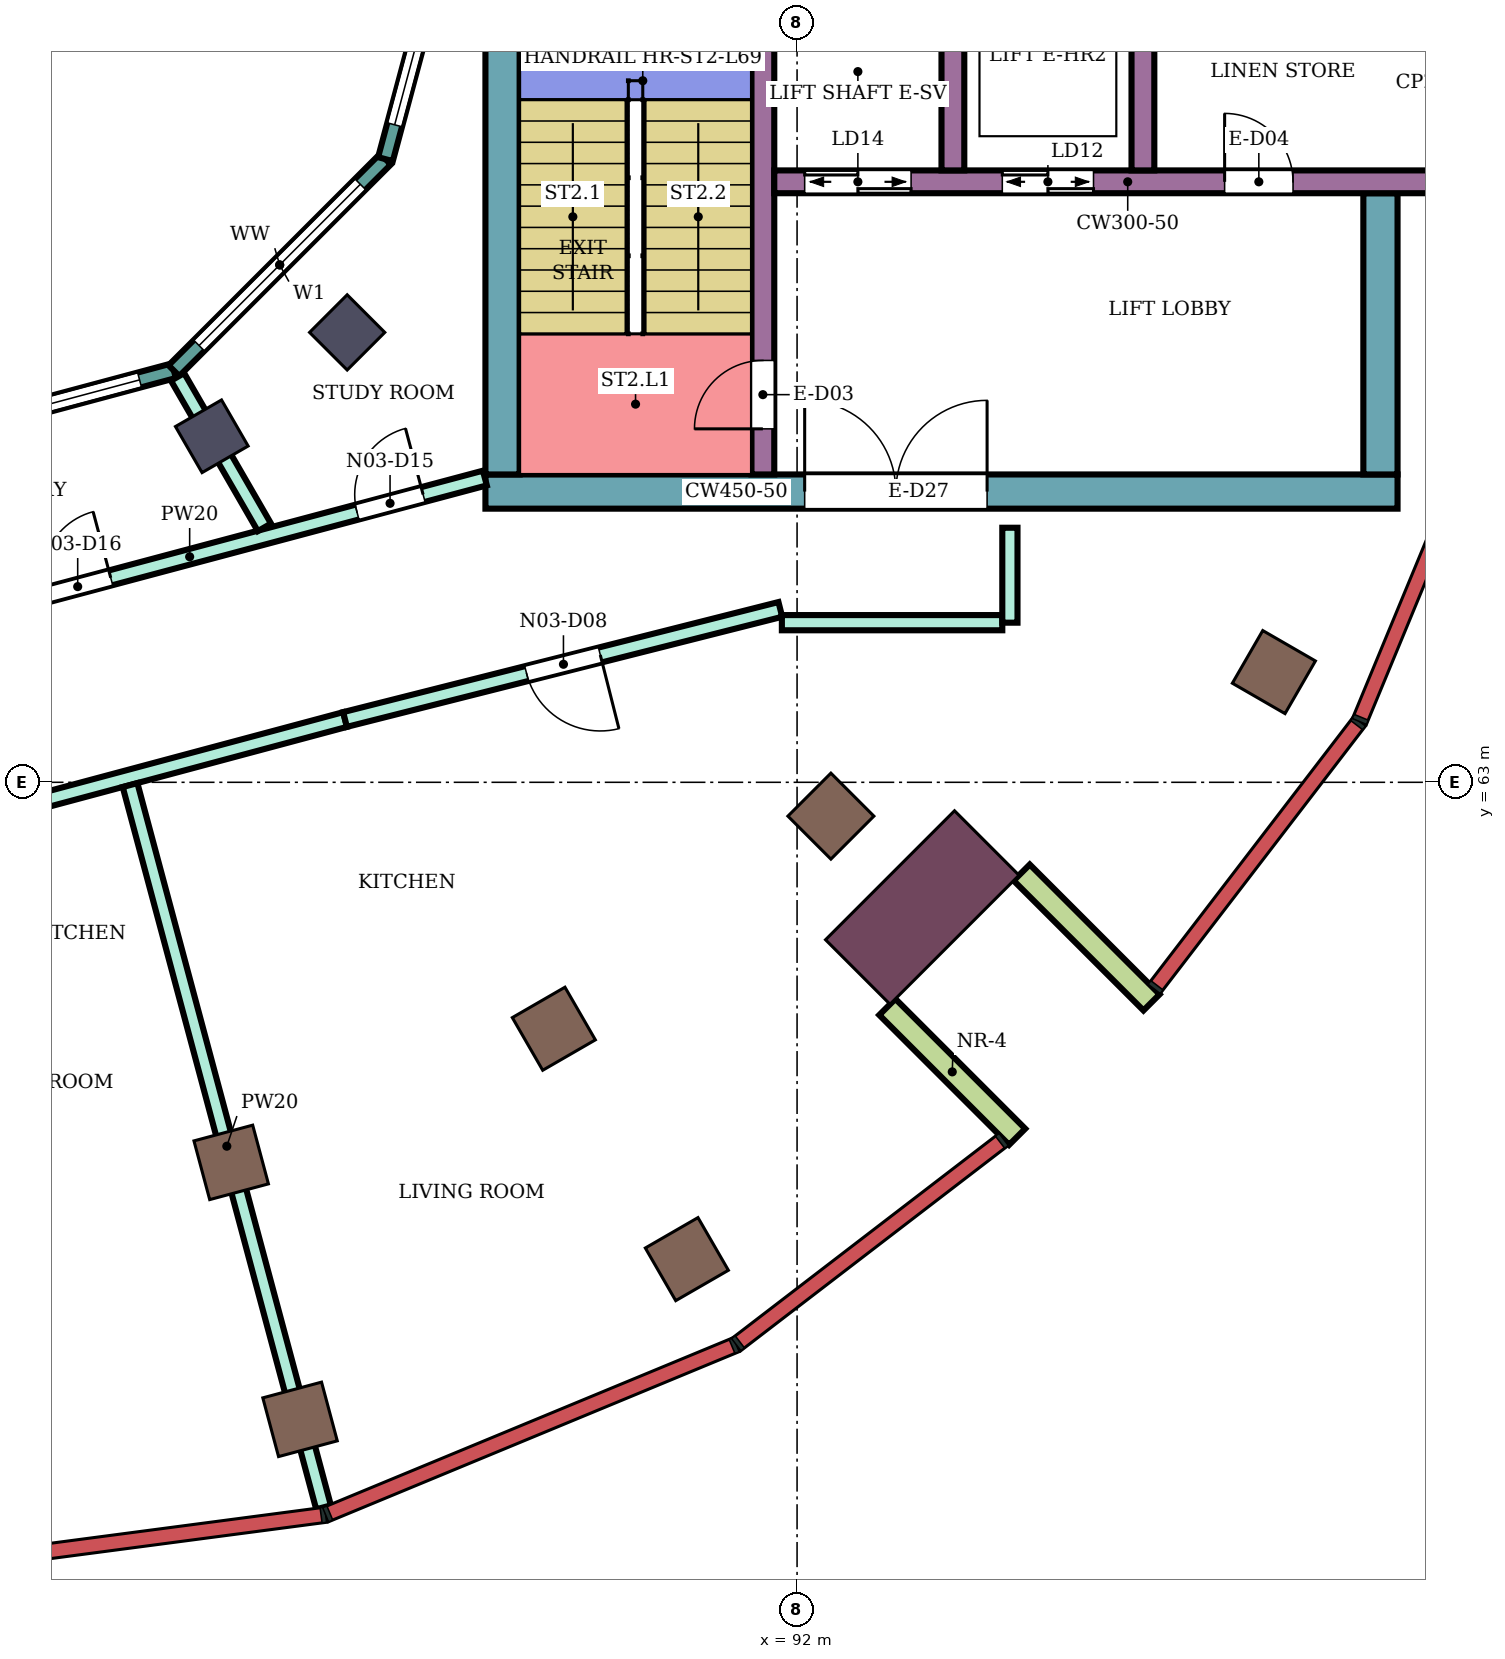
"""IFC4 building model, lengths in metres.
Left out: names, types, materials, properties, quantities, classifications, styles, units other than length and angle.
Written with IfcOpenShell. Run it as: python <this file> out.ifc"""

import sys

from ifc_helpers import new_model, si_unit, direction, frame, frame_2d, origin, origin_2d, place, context, subcontext, project, spatial, rectangle, extrude, element, fill, save


model = new_model("IFC4")
c1 = context("Model", 3, precision=1e-05, world=origin(), true_north=direction((0.0, 1.0)))
c2 = subcontext(c1, "Body", "Model", "MODEL_VIEW")
j1 = project(units=[si_unit("LENGTHUNIT", "METRE"), si_unit("PLANEANGLEUNIT", "RADIAN")], contexts=[c1])
p1 = place(None, origin())
s1 = spatial("IfcSite", under=j1, at=p1, CompositionType="ELEMENT")
p2 = place(p1, origin())
s2 = spatial("IfcBuilding", under=s1, at=p2, CompositionType="ELEMENT")
p3 = place(p2, frame((0.0, 0.0, 300.9)))
s3 = spatial("IfcBuildingStorey", under=s2, at=p3, CompositionType="ELEMENT", Elevation=300.9)
for number, where, z_axis, x_axis in (
    (1, (85.461, 54.619, 0.0), (0.0, 0.0, 1.0), (0.259, -0.966, 0.0)),
    (2, (90.55, 56.727, 0.0), (0.0, 0.0, 1.0), (0.5, -0.866, 0.0)),
    (3, (98.273, 64.45, 0.0), (0.0, 0.0, 1.0), (0.866, -0.5, 0.0)),
    (4, (84.555, 58.0, 0.0), (0.0, 0.0, 1.0), (0.259, -0.966, 0.0)),
    (5, (88.8, 59.758, 0.0), (0.0, 0.0, 1.0), (0.5, -0.866, 0.0)),
    (6, (92.445, 62.555, 0.0), (0.0, 0.0, 1.0), (0.707, -0.707, 0.0)),
):
    element("IfcColumn", number, at=place(p3, frame(where, z_axis=z_axis, x_axis=x_axis)), inside=s3, PredefinedType="COLUMN", context=c2, shape_type="SweptSolid", body=[
        extrude(rectangle(XDim=0.8, YDim=0.8, at=origin_2d()), origin(), (0.0, 0.0, 1.0), 4.2),
    ])
for number, where, z_axis, x_axis in (
    (7, (84.3, 67.552, 0.0), (0.0, 0.0, 1.0), (0.5, -0.866, 0.0)),
    (8, (86.081, 68.919, 0.0), (0.0, 0.0, 1.0), (0.707, -0.707, 0.0)),
):
    element("IfcColumn", number, at=place(p3, frame(where, z_axis=z_axis, x_axis=x_axis)), inside=s3, PredefinedType="COLUMN", context=c2, shape_type="SweptSolid", body=[
        extrude(rectangle(XDim=0.7, YDim=0.7, at=origin_2d()), origin(), (0.0, 0.0, 1.0), 4.2),
    ])
p4 = place(p3, frame((93.647, 61.353, 0.0), z_axis=(0.0, 0.0, 1.0), x_axis=(0.707106781187, -0.707106781187, 0.0)))
e9 = element("IfcColumn", 9, at=p4, inside=s3, PredefinedType="COLUMN", context=c2, shape_type="SweptSolid", body=[
    extrude(rectangle(XDim=1.2, YDim=2.4, at=origin_2d()), origin(), (0.0, 0.0, 1.0), 4.2),
])
p5 = place(p3, frame((87.9, 66.825, 0.0), z_axis=(0.0, 0.0, 1.0), x_axis=(1.0, 0.0, 0.0)))
e10 = element("IfcWall", 10, at=p5, inside=s3, PredefinedType="SHEAR", context=c2, shape_type="SweptSolid", body=[
    extrude(rectangle(XDim=12.0, YDim=0.45, at=frame_2d((6.0, 0.0))), origin(), (0.0, 0.0, 1.0), 3.88),
])
p6 = place(p5, frame((4.2, 0.0, 0.0)))
e11 = element("IfcOpeningElement", 11, at=p6, cuts=e10, PredefinedType="OPENING", context=c2, shape_type="SweptSolid", body=[
    extrude(rectangle(XDim=2.4, YDim=2.4, at=frame_2d((1.2, 1.2))), frame((0.0, 0.235, 0.0), z_axis=(0.0, -1.0, 0.0), x_axis=(1.0, 0.0, 0.0)), (0.0, 0.0, 1.0), 0.47),
])
p7 = place(p3, frame((88.125, 67.05, 0.0), z_axis=(0.0, 0.0, 1.0), x_axis=(0.0, 1.0, 0.0)))
e12 = element("IfcWall", 12, at=p7, inside=s3, PredefinedType="SHEAR", context=c2, shape_type="SweptSolid", body=[
    extrude(rectangle(XDim=7.95, YDim=0.45, at=frame_2d((3.975, 0.0))), origin(), (0.0, 0.0, 1.0), 3.88),
])
p8 = place(p3, frame((99.675, 67.05, 0.0), z_axis=(0.0, 0.0, 1.0), x_axis=(0.0, 1.0, 0.0)))
e13 = element("IfcWall", 13, at=p8, inside=s3, PredefinedType="SHEAR", context=c2, shape_type="SweptSolid", body=[
    extrude(rectangle(XDim=3.7, YDim=0.45, at=frame_2d((1.85, 0.0))), origin(), (0.0, 0.0, 1.0), 3.88),
])
p9 = place(p3, frame((91.55, 67.05, 0.0), z_axis=(0.0, 0.0, 1.0), x_axis=(0.0, 1.0, 0.0)))
e14 = element("IfcWall", 14, at=p9, inside=s3, PredefinedType="SHEAR", context=c2, shape_type="SweptSolid", body=[
    extrude(rectangle(XDim=7.95, YDim=0.3, at=frame_2d((3.975, 0.0))), origin(), (0.0, 0.0, 1.0), 3.88),
])
p10 = place(p9, frame((0.6, 0.0, 0.0)))
e15 = element("IfcOpeningElement", 15, at=p10, cuts=e14, PredefinedType="OPENING", context=c2, shape_type="SweptSolid", body=[
    extrude(rectangle(XDim=0.9, YDim=2.1, at=frame_2d((0.45, 1.05))), frame((0.0, 0.16, 0.0), z_axis=(0.0, -1.0, 0.0), x_axis=(1.0, 0.0, 0.0)), (0.0, 0.0, 1.0), 0.32),
])
p11 = place(p3, frame((91.7, 70.9, 0.0), z_axis=(0.0, 0.0, 1.0), x_axis=(1.0, 0.0, 0.0)))
e16 = element("IfcWall", 16, at=p11, inside=s3, PredefinedType="SHEAR", context=c2, shape_type="SweptSolid", body=[
    extrude(rectangle(XDim=9.3, YDim=0.3, at=frame_2d((4.65, 0.0))), origin(), (0.0, 0.0, 1.0), 3.88),
])
p12 = place(p11, frame((0.4, 0.0, 0.0)))
e17 = element("IfcOpeningElement", 17, at=p12, cuts=e16, PredefinedType="OPENING", context=c2, shape_type="SweptSolid", body=[
    extrude(rectangle(XDim=1.4, YDim=2.1, at=frame_2d((0.7, 1.05))), frame((0.0, 0.16, 0.0), z_axis=(0.0, -1.0, 0.0), x_axis=(1.0, 0.0, 0.0)), (0.0, 0.0, 1.0), 0.32),
])
p13 = place(p11, frame((3.0, 0.0, 0.0)))
e18 = element("IfcOpeningElement", 18, at=p13, cuts=e16, PredefinedType="OPENING", context=c2, shape_type="SweptSolid", body=[
    extrude(rectangle(XDim=1.2, YDim=2.1, at=frame_2d((0.6, 1.05))), frame((0.0, 0.16, 0.0), z_axis=(0.0, -1.0, 0.0), x_axis=(1.0, 0.0, 0.0)), (0.0, 0.0, 1.0), 0.32),
])
p14 = place(p11, frame((5.925, 0.0, 0.0)))
e19 = element("IfcOpeningElement", 19, at=p14, cuts=e16, PredefinedType="OPENING", context=c2, shape_type="SweptSolid", body=[
    extrude(rectangle(XDim=0.9, YDim=2.1, at=frame_2d((0.45, 1.05))), frame((0.0, 0.16, 0.0), z_axis=(0.0, -1.0, 0.0), x_axis=(1.0, 0.0, 0.0)), (0.0, 0.0, 1.0), 0.32),
])
for number, where, z_axis, x_axis in (
    (20, (94.05, 71.05, 0.0), (0.0, 0.0, 1.0), (0.0, 1.0, 0.0)),
    (21, (96.55, 71.05, 0.0), (0.0, 0.0, 1.0), (0.0, 1.0, 0.0)),
):
    element("IfcWall", number, at=place(p3, frame(where, z_axis=z_axis, x_axis=x_axis)), inside=s3, PredefinedType="SHEAR", context=c2, shape_type="SweptSolid", body=[
        extrude(rectangle(XDim=2.55, YDim=0.3, at=frame_2d((1.275, 0.0))), origin(), (0.0, 0.0, 1.0), 3.88),
    ])
for number, where, z_axis, x_axis in (
    (22, (93.188, 60.045, 0.0), (0.0, 0.0, 1.0), (0.707, -0.707, 0.0)),
    (23, (94.955, 61.812, 0.0), (0.0, 0.0, 1.0), (0.707, -0.707, 0.0)),
):
    element("IfcWall", number, at=place(p3, frame(where, z_axis=z_axis, x_axis=x_axis)), inside=s3, PredefinedType="NOTDEFINED", context=c2, shape_type="SweptSolid", body=[
        extrude(rectangle(XDim=2.416, YDim=0.3, at=frame_2d((1.208, 0.0))), origin(), (0.0, 0.0, 1.0), 4.2),
    ])
p15 = place(p3, frame((80.0, 67.396, 0.0), z_axis=(0.0, 0.0, 1.0), x_axis=(0.965933654434, 0.258789828301, 0.0)))
e24 = element("IfcWall", 24, at=p15, inside=s3, PredefinedType="NOTDEFINED", context=c2, shape_type="SweptSolid", body=[
    extrude(rectangle(XDim=3.936, YDim=0.2, at=frame_2d((1.968, 0.0))), origin(), (0.0, 0.0, 1.0), 4.2),
])
p16 = place(p15, frame((0.468, 0.0, 0.9)))
e25 = element("IfcOpeningElement", 25, at=p16, cuts=e24, PredefinedType="OPENING", context=c2, shape_type="SweptSolid", body=[
    extrude(rectangle(XDim=3.0, YDim=2.3, at=frame_2d((1.5, 1.15))), frame((0.0, 0.11, 0.0), z_axis=(0.0, -1.0, 0.0), x_axis=(1.0, 0.0, 0.0)), (0.0, 0.0, 1.0), 0.22),
])
p17 = place(p3, frame((83.802, 68.415, 0.0), z_axis=(0.0, 0.0, 1.0), x_axis=(0.707106781187, 0.707106781187, 0.0)))
e26 = element("IfcWall", 26, at=p17, inside=s3, PredefinedType="NOTDEFINED", context=c2, shape_type="SweptSolid", body=[
    extrude(rectangle(XDim=3.936, YDim=0.2, at=frame_2d((1.968, 0.0))), origin(), (0.0, 0.0, 1.0), 4.2),
])
p18 = place(p17, frame((0.468, 0.0, 0.9)))
e27 = element("IfcOpeningElement", 27, at=p18, cuts=e26, PredefinedType="OPENING", context=c2, shape_type="SweptSolid", body=[
    extrude(rectangle(XDim=3.0, YDim=2.3, at=frame_2d((1.5, 1.15))), frame((0.0, 0.11, 0.0), z_axis=(0.0, -1.0, 0.0), x_axis=(1.0, 0.0, 0.0)), (0.0, 0.0, 1.0), 0.22),
])
p19 = place(p3, frame((86.585, 71.198, 0.0), z_axis=(0.0, 0.0, 1.0), x_axis=(0.258789828301, 0.965933654434, 0.0)))
e28 = element("IfcWall", 28, at=p19, inside=s3, PredefinedType="NOTDEFINED", context=c2, shape_type="SweptSolid", body=[
    extrude(rectangle(XDim=3.936, YDim=0.2, at=frame_2d((1.968, 0.0))), origin(), (0.0, 0.0, 1.0), 4.2),
])
p20 = place(p19, frame((0.468, 0.0, 0.9)))
e29 = element("IfcOpeningElement", 29, at=p20, cuts=e28, PredefinedType="OPENING", context=c2, shape_type="SweptSolid", body=[
    extrude(rectangle(XDim=3.0, YDim=2.3, at=frame_2d((1.5, 1.15))), frame((0.0, 0.11, 0.0), z_axis=(0.0, -1.0, 0.0), x_axis=(1.0, 0.0, 0.0)), (0.0, 0.0, 1.0), 0.22),
])
p21 = place(p3, frame((80.125, 64.932, 0.0), z_axis=(0.0, 0.0, 1.0), x_axis=(0.966236955806, 0.257655089674, 0.0)))
e30 = element("IfcWall", 30, at=p21, inside=s3, PredefinedType="PARTITIONING", context=c2, shape_type="SweptSolid", body=[
    extrude(rectangle(XDim=8.039, YDim=0.2, at=frame_2d((4.02, 0.0))), origin(), (0.0, 0.0, 1.0), 3.75),
])
p22 = place(p21, frame((6.298, 0.0, 0.0)))
e31 = element("IfcOpeningElement", 31, at=p22, cuts=e30, PredefinedType="OPENING", context=c2, shape_type="SweptSolid", body=[
    extrude(rectangle(XDim=0.9, YDim=2.1, at=frame_2d((0.45, 1.05))), frame((0.0, 0.11, 0.0), z_axis=(0.0, -1.0, 0.0), x_axis=(1.0, 0.0, 0.0)), (0.0, 0.0, 1.0), 0.22),
])
p23 = place(p21, frame((2.045, 0.0, 0.0)))
e32 = element("IfcOpeningElement", 32, at=p23, cuts=e30, PredefinedType="OPENING", context=c2, shape_type="SweptSolid", body=[
    extrude(rectangle(XDim=0.9, YDim=2.1, at=frame_2d((0.45, 1.05))), frame((0.0, 0.11, 0.0), z_axis=(0.0, -1.0, 0.0), x_axis=(1.0, 0.0, 0.0)), (0.0, 0.0, 1.0), 0.22),
])
p24 = place(p3, frame((80.048, 62.217, 0.0), z_axis=(0.0, 0.0, 1.0), x_axis=(0.965937709386, 0.258774692708, 0.0)))
e33 = element("IfcWall", 33, at=p24, inside=s3, PredefinedType="PARTITIONING", context=c2, shape_type="SweptSolid", body=[
    extrude(rectangle(XDim=6.216, YDim=0.2, at=frame_2d((3.108, 0.0))), origin(), (0.0, 0.0, 1.0), 3.75),
])
p25 = place(p24, frame((0.5, 0.0, 0.0)))
e34 = element("IfcOpeningElement", 34, at=p25, cuts=e33, PredefinedType="OPENING", context=c2, shape_type="SweptSolid", body=[
    extrude(rectangle(XDim=1.0, YDim=2.1, at=frame_2d((0.5, 1.05))), frame((0.0, 0.11, 0.0), z_axis=(0.0, -1.0, 0.0), x_axis=(1.0, 0.0, 0.0)), (0.0, 0.0, 1.0), 0.22),
])
p26 = place(p3, frame((83.225, 62.963, 0.0), z_axis=(0.0, 0.0, 1.0), x_axis=(0.258782398991, -0.96593564484, 0.0)))
e35 = element("IfcWall", 35, at=p26, inside=s3, PredefinedType="PARTITIONING", context=c2, shape_type="SweptSolid", body=[
    extrude(rectangle(XDim=9.837, YDim=0.2, at=frame_2d((4.918, 0.0))), origin(), (0.0, 0.0, 1.0), 3.75),
])
p27 = place(p3, frame((83.85, 68.333, 0.0), z_axis=(0.0, 0.0, 1.0), x_axis=(0.500080019051, -0.865979199835, 0.0)))
e36 = element("IfcWall", 36, at=p27, inside=s3, PredefinedType="PARTITIONING", context=c2, shape_type="SweptSolid", body=[
    extrude(rectangle(XDim=2.285, YDim=0.2, at=frame_2d((1.143, 0.0))), origin(), (0.0, 0.0, 1.0), 3.75),
])
p28 = place(p3, frame((86.053, 63.826, 0.0), z_axis=(0.0, 0.0, 1.0), x_axis=(0.969480070232, 0.245170131586, 0.0)))
e37 = element("IfcWall", 37, at=p28, inside=s3, PredefinedType="PARTITIONING", context=c2, shape_type="SweptSolid", body=[
    extrude(rectangle(XDim=5.907, YDim=0.2, at=frame_2d((2.954, 0.0))), origin(), (0.0, 0.0, 1.0), 3.75),
])
p29 = place(p28, frame((2.464, 0.0, 0.0)))
e38 = element("IfcOpeningElement", 38, at=p29, cuts=e37, PredefinedType="OPENING", context=c2, shape_type="SweptSolid", body=[
    extrude(rectangle(XDim=1.0, YDim=2.1, at=frame_2d((0.5, 1.05))), frame((0.0, 0.11, 0.0), z_axis=(0.0, -1.0, 0.0), x_axis=(1.0, 0.0, 0.0)), (0.0, 0.0, 1.0), 0.22),
])
p30 = place(p3, frame((91.8, 65.1, 0.0), z_axis=(0.0, 0.0, 1.0), x_axis=(1.0, 0.0, 0.0)))
e39 = element("IfcWall", 39, at=p30, inside=s3, PredefinedType="PARTITIONING", context=c2, shape_type="SweptSolid", body=[
    extrude(rectangle(XDim=2.9, YDim=0.2, at=frame_2d((1.45, 0.0))), origin(), (0.0, 0.0, 1.0), 3.75),
])
p31 = place(p3, frame((94.8, 65.1, 0.0), z_axis=(0.0, 0.0, 1.0), x_axis=(0.0, 1.0, 0.0)))
e40 = element("IfcWall", 40, at=p31, inside=s3, PredefinedType="PARTITIONING", context=c2, shape_type="SweptSolid", body=[
    extrude(rectangle(XDim=1.249, YDim=0.2, at=frame_2d((0.625, 0.0))), origin(), (0.0, 0.0, 1.0), 3.75),
])
p32 = place(p16, origin())
e41 = element("IfcWindow", 41, at=p32, inside=s3, PartitioningType="SINGLE_PANEL", PredefinedType="WINDOW", context=c2, shape_type="SweptSolid", body=[
    extrude(rectangle(XDim=3.0, YDim=2.3, at=frame_2d((1.5, 1.15))), frame((0.0, 0.03, 0.0), z_axis=(0.0, -1.0, 0.0), x_axis=(1.0, 0.0, 0.0)), (0.0, 0.0, 1.0), 0.06),
])
fill(e25, e41)
p33 = place(p18, origin())
e42 = element("IfcWindow", 42, at=p33, inside=s3, PartitioningType="SINGLE_PANEL", PredefinedType="WINDOW", context=c2, shape_type="SweptSolid", body=[
    extrude(rectangle(XDim=3.0, YDim=2.3, at=frame_2d((1.5, 1.15))), frame((0.0, 0.03, 0.0), z_axis=(0.0, -1.0, 0.0), x_axis=(1.0, 0.0, 0.0)), (0.0, 0.0, 1.0), 0.06),
])
fill(e27, e42)
p34 = place(p20, origin())
e43 = element("IfcWindow", 43, at=p34, inside=s3, PartitioningType="SINGLE_PANEL", PredefinedType="WINDOW", context=c2, shape_type="SweptSolid", body=[
    extrude(rectangle(XDim=3.0, YDim=2.3, at=frame_2d((1.5, 1.15))), frame((0.0, 0.03, 0.0), z_axis=(0.0, -1.0, 0.0), x_axis=(1.0, 0.0, 0.0)), (0.0, 0.0, 1.0), 0.06),
])
fill(e29, e43)
p35 = place(p29, frame((1.0, 0.0, 0.0), z_axis=(0.0, 0.0, 1.0), x_axis=(-1.0, 0.0, 0.0)))
e44 = element("IfcDoor", 44, at=p35, inside=s3, OperationType="SINGLE_SWING_LEFT", PredefinedType="DOOR", context=c2, shape_type="SweptSolid", body=[
    extrude(rectangle(XDim=1.0, YDim=2.1, at=frame_2d((0.5, 1.05))), frame((0.0, 0.025, 0.0), z_axis=(0.0, -1.0, 0.0), x_axis=(1.0, 0.0, 0.0)), (0.0, 0.0, 1.0), 0.05),
])
fill(e38, e44)
p36 = place(p22, origin())
e45 = element("IfcDoor", 45, at=p36, inside=s3, OperationType="SINGLE_SWING_RIGHT", PredefinedType="DOOR", context=c2, shape_type="SweptSolid", body=[
    extrude(rectangle(XDim=0.9, YDim=2.1, at=frame_2d((0.45, 1.05))), frame((0.0, 0.025, 0.0), z_axis=(0.0, -1.0, 0.0), x_axis=(1.0, 0.0, 0.0)), (0.0, 0.0, 1.0), 0.05),
])
fill(e31, e45)
p37 = place(p23, origin())
e46 = element("IfcDoor", 46, at=p37, inside=s3, OperationType="SINGLE_SWING_RIGHT", PredefinedType="DOOR", context=c2, shape_type="SweptSolid", body=[
    extrude(rectangle(XDim=0.9, YDim=2.1, at=frame_2d((0.45, 1.05))), frame((0.0, 0.025, 0.0), z_axis=(0.0, -1.0, 0.0), x_axis=(1.0, 0.0, 0.0)), (0.0, 0.0, 1.0), 0.05),
])
fill(e32, e46)
p38 = place(p10, origin())
e47 = element("IfcDoor", 47, at=p38, inside=s3, OperationType="SINGLE_SWING_LEFT", PredefinedType="DOOR", context=c2, shape_type="SweptSolid", body=[
    extrude(rectangle(XDim=0.9, YDim=2.1, at=frame_2d((0.45, 1.05))), frame((0.0, 0.025, 0.0), z_axis=(0.0, -1.0, 0.0), x_axis=(1.0, 0.0, 0.0)), (0.0, 0.0, 1.0), 0.05),
])
fill(e15, e47)
p39 = place(p12, origin())
e48 = element("IfcDoor", 48, at=p39, inside=s3, OperationType="DOUBLE_DOOR_SLIDING", PredefinedType="DOOR", context=c2, shape_type="SweptSolid", body=[
    extrude(rectangle(XDim=1.4, YDim=2.1, at=frame_2d((0.7, 1.05))), frame((0.0, 0.025, 0.0), z_axis=(0.0, -1.0, 0.0), x_axis=(1.0, 0.0, 0.0)), (0.0, 0.0, 1.0), 0.05),
])
fill(e17, e48)
p40 = place(p13, origin())
e49 = element("IfcDoor", 49, at=p40, inside=s3, OperationType="DOUBLE_DOOR_SLIDING", PredefinedType="DOOR", context=c2, shape_type="SweptSolid", body=[
    extrude(rectangle(XDim=1.2, YDim=2.1, at=frame_2d((0.6, 1.05))), frame((0.0, 0.025, 0.0), z_axis=(0.0, -1.0, 0.0), x_axis=(1.0, 0.0, 0.0)), (0.0, 0.0, 1.0), 0.05),
])
fill(e18, e49)
p41 = place(p14, origin())
e50 = element("IfcDoor", 50, at=p41, inside=s3, OperationType="SINGLE_SWING_LEFT", PredefinedType="DOOR", context=c2, shape_type="SweptSolid", body=[
    extrude(rectangle(XDim=0.9, YDim=2.1, at=frame_2d((0.45, 1.05))), frame((0.0, 0.025, 0.0), z_axis=(0.0, -1.0, 0.0), x_axis=(1.0, 0.0, 0.0)), (0.0, 0.0, 1.0), 0.05),
])
fill(e19, e50)
p42 = place(p6, origin())
e51 = element("IfcDoor", 51, at=p42, inside=s3, OperationType="DOUBLE_DOOR_SINGLE_SWING", PredefinedType="DOOR", context=c2, shape_type="SweptSolid", body=[
    extrude(rectangle(XDim=2.4, YDim=2.4, at=frame_2d((1.2, 1.2))), frame((0.0, 0.025, 0.0), z_axis=(0.0, -1.0, 0.0), x_axis=(1.0, 0.0, 0.0)), (0.0, 0.0, 1.0), 0.05),
])
fill(e11, e51)
save(model, sys.argv[1])
